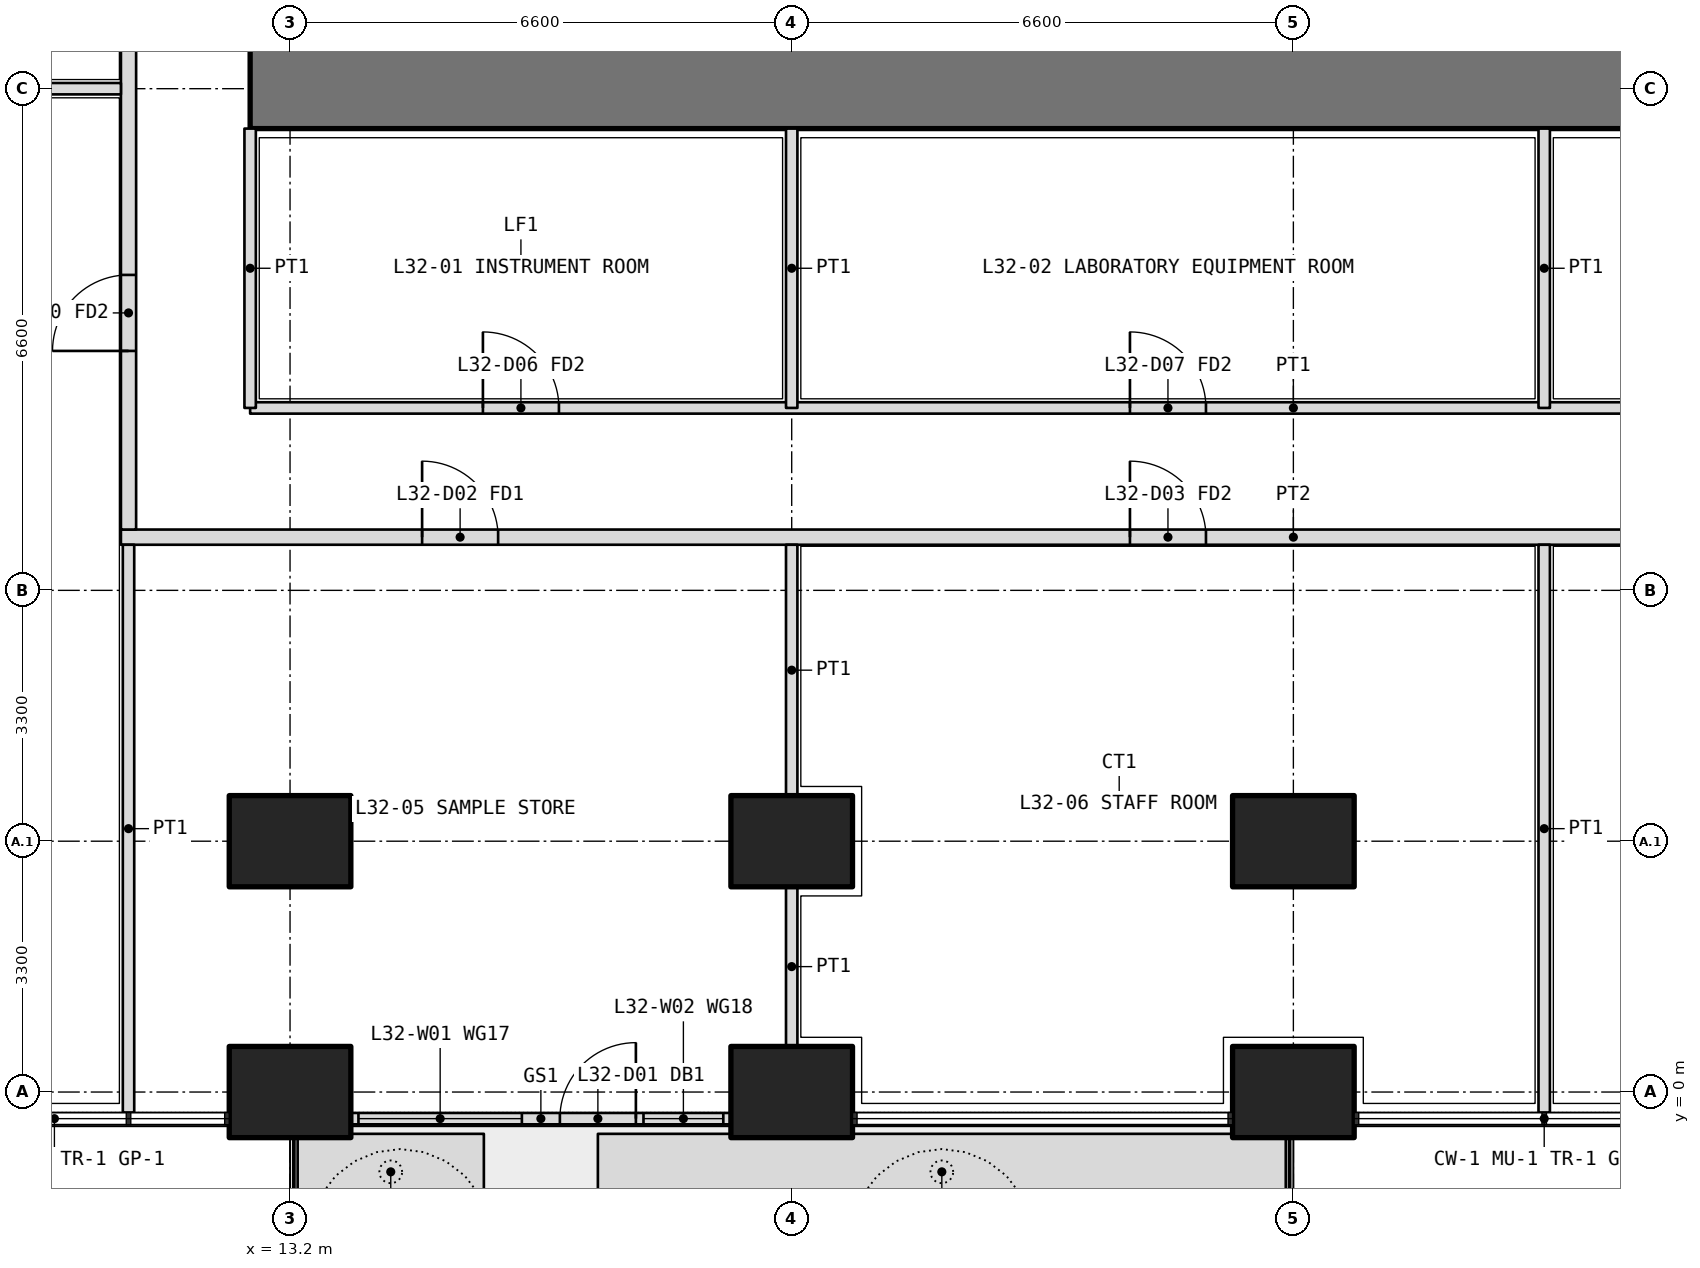
"""IFC4 building model, lengths in metres.
Left out: names, types, materials, properties, quantities, classifications, styles, units other than length and angle.
Written with IfcOpenShell. Run it as: python <this file> out.ifc"""

import sys

from ifc_helpers import new_model, si_unit, direction, frame, frame_2d, origin, origin_2d, place, context, subcontext, project, spatial, polyline, rectangle, outline, extrude, element, fill, save


model = new_model("IFC4")
c1 = context("Model", 3, precision=1e-05, world=origin(), true_north=direction((0.0, 1.0)))
c2 = subcontext(c1, "Body", "Model", "MODEL_VIEW")
j1 = project(units=[si_unit("LENGTHUNIT", "METRE"), si_unit("PLANEANGLEUNIT", "RADIAN")], contexts=[c1])
p1 = place(None, origin())
s1 = spatial("IfcSite", under=j1, at=p1, CompositionType="ELEMENT")
p2 = place(p1, origin())
s2 = spatial("IfcBuilding", under=s1, at=p2, CompositionType="ELEMENT")
p3 = place(p2, frame((0.0, 0.0, 141.0)))
s3 = spatial("IfcBuildingStorey", under=s2, at=p3, CompositionType="ELEMENT", Elevation=141.0)
for number, where, z_axis, x_axis in (
    (1, (13.2, 0.0, 0.0), (0.0, 0.0, 1.0), (1.0, 0.0, 0.0)),
    (2, (19.8, 0.0, 0.0), (0.0, 0.0, 1.0), (1.0, 0.0, 0.0)),
    (3, (26.4, 0.0, 0.0), (0.0, 0.0, 1.0), (1.0, 0.0, 0.0)),
    (4, (13.2, 3.3, 0.0), (0.0, 0.0, 1.0), (1.0, 0.0, 0.0)),
    (5, (19.8, 3.3, 0.0), (0.0, 0.0, 1.0), (1.0, 0.0, 0.0)),
    (6, (26.4, 3.3, 0.0), (0.0, 0.0, 1.0), (1.0, 0.0, 0.0)),
):
    element("IfcColumn", number, at=place(p3, frame(where, z_axis=z_axis, x_axis=x_axis)), inside=s3, PredefinedType="COLUMN", context=c2, shape_type="SweptSolid", body=[
        extrude(rectangle(XDim=1.6, YDim=1.2, at=origin_2d()), origin(), (0.0, 0.0, 1.0), 4.2),
    ])
p4 = place(p3, origin())
e7 = element("IfcWall", 7, at=p4, inside=s3, PredefinedType="USERDEFINED", context=c2, shape_type="SweptSolid", body=[
    extrude(outline(polyline([(13.3, -1.55), (15.75, -1.55), (15.75, -0.55), (13.3, -0.55), (13.3, -1.55)]), holes=[polyline([(13.45, -1.4), (15.6, -1.4), (15.6, -0.7), (13.45, -0.7), (13.45, -1.4)])]), origin(), (0.0, 0.0, 1.0), 1.05),
])
p5 = place(p3, origin())
e8 = element("IfcWall", 8, at=p5, inside=s3, PredefinedType="USERDEFINED", context=c2, shape_type="SweptSolid", body=[
    extrude(outline(polyline([(17.25, -1.55), (26.3, -1.55), (26.3, -0.55), (17.25, -0.55), (17.25, -1.55)]), holes=[polyline([(17.4, -1.4), (26.15, -1.4), (26.15, -0.7), (17.4, -0.7), (17.4, -1.4)])]), origin(), (0.0, 0.0, 1.0), 1.05),
])
p6 = place(p3, frame((14.0, -0.35, 0.0), z_axis=(0.0, 0.0, 1.0), x_axis=(1.0, 0.0, 0.0)))
e9 = element("IfcWall", 9, at=p6, inside=s3, PredefinedType="SOLIDWALL", context=c2, shape_type="SweptSolid", body=[
    extrude(rectangle(XDim=5.0, YDim=0.15, at=frame_2d((2.5, 0.0))), origin(), (0.0, 0.0, 1.0), 2.6),
])
p7 = place(p6, frame((2.75, 0.0, 0.0)))
e10 = element("IfcOpeningElement", 10, at=p7, cuts=e9, PredefinedType="OPENING", context=c2, shape_type="SweptSolid", body=[
    extrude(rectangle(XDim=1.0, YDim=2.4, at=frame_2d((0.5, 1.2))), frame((0.0, 0.085, 0.0), z_axis=(0.0, -1.0, 0.0), x_axis=(1.0, 0.0, 0.0)), (0.0, 0.0, 1.0), 0.17),
])
p8 = place(p6, frame((0.1, 0.0, 0.1)))
e11 = element("IfcOpeningElement", 11, at=p8, cuts=e9, PredefinedType="OPENING", context=c2, shape_type="SweptSolid", body=[
    extrude(rectangle(XDim=2.15, YDim=2.2, at=frame_2d((1.075, 1.1))), frame((0.0, 0.085, 0.0), z_axis=(0.0, -1.0, 0.0), x_axis=(1.0, 0.0, 0.0)), (0.0, 0.0, 1.0), 0.17),
])
p9 = place(p6, frame((3.85, 0.0, 0.1)))
e12 = element("IfcOpeningElement", 12, at=p9, cuts=e9, PredefinedType="OPENING", context=c2, shape_type="SweptSolid", body=[
    extrude(rectangle(XDim=1.05, YDim=2.2, at=frame_2d((0.525, 1.1))), frame((0.0, 0.085, 0.0), z_axis=(0.0, -1.0, 0.0), x_axis=(1.0, 0.0, 0.0)), (0.0, 0.0, 1.0), 0.17),
])
p10 = place(p3, frame((12.675, 13.2, 0.0), z_axis=(0.0, 0.0, 1.0), x_axis=(1.0, 0.0, 0.0)))
e13 = element("IfcWall", 13, at=p10, inside=s3, PredefinedType="SHEAR", context=c2, shape_type="SweptSolid", body=[
    extrude(rectangle(XDim=27.45, YDim=1.05, at=frame_2d((13.725, 0.0))), origin(), (0.0, 0.0, 1.0), 4.2),
])
p11 = place(p3, frame((12.675, 9.0, 0.0), z_axis=(0.0, 0.0, 1.0), x_axis=(1.0, 0.0, 0.0)))
e14 = element("IfcWall", 14, at=p11, inside=s3, PredefinedType="PARTITIONING", context=c2, shape_type="SweptSolid", body=[
    extrude(rectangle(XDim=27.45, YDim=0.15, at=frame_2d((13.725, 0.0))), origin(), (0.0, 0.0, 1.0), 2.85),
])
p12 = place(p11, frame((3.062, 0.0, 0.0)))
e15 = element("IfcOpeningElement", 15, at=p12, cuts=e14, PredefinedType="OPENING", context=c2, shape_type="SweptSolid", body=[
    extrude(rectangle(XDim=1.0, YDim=2.1, at=frame_2d((0.5, 1.05))), frame((0.0, 0.085, 0.0), z_axis=(0.0, -1.0, 0.0), x_axis=(1.0, 0.0, 0.0)), (0.0, 0.0, 1.0), 0.17),
])
p13 = place(p11, frame((11.575, 0.0, 0.0)))
e16 = element("IfcOpeningElement", 16, at=p13, cuts=e14, PredefinedType="OPENING", context=c2, shape_type="SweptSolid", body=[
    extrude(rectangle(XDim=1.0, YDim=2.1, at=frame_2d((0.5, 1.05))), frame((0.0, 0.085, 0.0), z_axis=(0.0, -1.0, 0.0), x_axis=(1.0, 0.0, 0.0)), (0.0, 0.0, 1.0), 0.17),
])
p14 = place(p11, frame((19.825, 0.0, 0.0)))
e17 = element("IfcOpeningElement", 17, at=p14, cuts=e14, PredefinedType="OPENING", context=c2, shape_type="SweptSolid", body=[
    extrude(rectangle(XDim=1.0, YDim=2.1, at=frame_2d((0.5, 1.05))), frame((0.0, 0.085, 0.0), z_axis=(0.0, -1.0, 0.0), x_axis=(1.0, 0.0, 0.0)), (0.0, 0.0, 1.0), 0.17),
])
p15 = place(p11, frame((25.038, 0.0, 0.0)))
e18 = element("IfcOpeningElement", 18, at=p15, cuts=e14, PredefinedType="OPENING", context=c2, shape_type="SweptSolid", body=[
    extrude(rectangle(XDim=1.0, YDim=2.1, at=frame_2d((0.5, 1.05))), frame((0.0, 0.085, 0.0), z_axis=(0.0, -1.0, 0.0), x_axis=(1.0, 0.0, 0.0)), (0.0, 0.0, 1.0), 0.17),
])
for number, where, z_axis, x_axis in (
    (19, (12.675, 12.675, 0.0), (0.0, 0.0, 1.0), (0.0, -1.0, 0.0)),
    (20, (19.8, 12.675, 0.0), (0.0, 0.0, 1.0), (0.0, -1.0, 0.0)),
):
    element("IfcWall", number, at=place(p3, frame(where, z_axis=z_axis, x_axis=x_axis)), inside=s3, PredefinedType="PARTITIONING", context=c2, shape_type="SweptSolid", body=[
        extrude(rectangle(XDim=3.675, YDim=0.15, at=frame_2d((1.837, 0.0))), origin(), (0.0, 0.0, 1.0), 2.85),
    ])
p16 = place(p3, frame((29.7, 12.675, 0.0), z_axis=(0.0, 0.0, 1.0), x_axis=(0.0, -1.0, 0.0)))
e21 = element("IfcWall", 21, at=p16, inside=s3, PredefinedType="PARTITIONING", context=c2, shape_type="SweptSolid", body=[
    extrude(rectangle(XDim=3.675, YDim=0.15, at=frame_2d((1.837, 0.0))), origin(), (0.0, 0.0, 1.0), 3.9),
])
p17 = place(p3, frame((10.975, 7.3, 0.0), z_axis=(0.0, 0.0, 1.0), x_axis=(1.0, 0.0, 0.0)))
e22 = element("IfcWall", 22, at=p17, inside=s3, PredefinedType="PARTITIONING", context=c2, shape_type="SweptSolid", body=[
    extrude(rectangle(XDim=30.85, YDim=0.2, at=frame_2d((15.425, 0.0))), origin(), (0.0, 0.0, 1.0), 2.85),
])
p18 = place(p17, frame((3.962, 0.0, 0.0)))
e23 = element("IfcOpeningElement", 23, at=p18, cuts=e22, PredefinedType="OPENING", context=c2, shape_type="SweptSolid", body=[
    extrude(rectangle(XDim=1.0, YDim=2.1, at=frame_2d((0.5, 1.05))), frame((0.0, 0.11, 0.0), z_axis=(0.0, -1.0, 0.0), x_axis=(1.0, 0.0, 0.0)), (0.0, 0.0, 1.0), 0.22),
])
p19 = place(p17, frame((13.275, 0.0, 0.0)))
e24 = element("IfcOpeningElement", 24, at=p19, cuts=e22, PredefinedType="OPENING", context=c2, shape_type="SweptSolid", body=[
    extrude(rectangle(XDim=1.0, YDim=2.1, at=frame_2d((0.5, 1.05))), frame((0.0, 0.11, 0.0), z_axis=(0.0, -1.0, 0.0), x_axis=(1.0, 0.0, 0.0)), (0.0, 0.0, 1.0), 0.22),
])
p20 = place(p17, frame((21.525, 0.0, 0.0)))
e25 = element("IfcOpeningElement", 25, at=p20, cuts=e22, PredefinedType="OPENING", context=c2, shape_type="SweptSolid", body=[
    extrude(rectangle(XDim=1.0, YDim=2.1, at=frame_2d((0.5, 1.05))), frame((0.0, 0.11, 0.0), z_axis=(0.0, -1.0, 0.0), x_axis=(1.0, 0.0, 0.0)), (0.0, 0.0, 1.0), 0.22),
])
p21 = place(p17, frame((27.438, 0.0, 0.0)))
e26 = element("IfcOpeningElement", 26, at=p21, cuts=e22, PredefinedType="OPENING", context=c2, shape_type="SweptSolid", body=[
    extrude(rectangle(XDim=1.2, YDim=2.1, at=frame_2d((0.6, 1.05))), frame((0.0, 0.11, 0.0), z_axis=(0.0, -1.0, 0.0), x_axis=(1.0, 0.0, 0.0)), (0.0, 0.0, 1.0), 0.22),
])
p22 = place(p3, frame((11.075, 7.4, 0.0), z_axis=(0.0, 0.0, 1.0), x_axis=(0.0, 1.0, 0.0)))
e27 = element("IfcWall", 27, at=p22, inside=s3, PredefinedType="PARTITIONING", context=c2, shape_type="SweptSolid", body=[
    extrude(rectangle(XDim=27.625, YDim=0.2, at=frame_2d((13.812, 0.0))), origin(), (0.0, 0.0, 1.0), 2.85),
])
p23 = place(p22, frame((2.35, 0.0, 0.0)))
e28 = element("IfcOpeningElement", 28, at=p23, cuts=e27, PredefinedType="OPENING", context=c2, shape_type="SweptSolid", body=[
    extrude(rectangle(XDim=1.0, YDim=2.1, at=frame_2d((0.5, 1.05))), frame((0.0, 0.11, 0.0), z_axis=(0.0, -1.0, 0.0), x_axis=(1.0, 0.0, 0.0)), (0.0, 0.0, 1.0), 0.22),
])
p24 = place(p22, frame((6.35, 0.0, 0.0)))
e29 = element("IfcOpeningElement", 29, at=p24, cuts=e27, PredefinedType="OPENING", context=c2, shape_type="SweptSolid", body=[
    extrude(rectangle(XDim=1.0, YDim=2.1, at=frame_2d((0.5, 1.05))), frame((0.0, 0.11, 0.0), z_axis=(0.0, -1.0, 0.0), x_axis=(1.0, 0.0, 0.0)), (0.0, 0.0, 1.0), 0.22),
])
p25 = place(p22, frame((9.4, 0.0, 0.0)))
e30 = element("IfcOpeningElement", 30, at=p25, cuts=e27, PredefinedType="OPENING", context=c2, shape_type="SweptSolid", body=[
    extrude(rectangle(XDim=0.9, YDim=2.1, at=frame_2d((0.45, 1.05))), frame((0.0, 0.11, 0.0), z_axis=(0.0, -1.0, 0.0), x_axis=(1.0, 0.0, 0.0)), (0.0, 0.0, 1.0), 0.22),
])
p26 = place(p22, frame((13.2, 0.0, 0.0)))
e31 = element("IfcOpeningElement", 31, at=p26, cuts=e27, PredefinedType="OPENING", context=c2, shape_type="SweptSolid", body=[
    extrude(rectangle(XDim=0.9, YDim=2.1, at=frame_2d((0.45, 1.05))), frame((0.0, 0.11, 0.0), z_axis=(0.0, -1.0, 0.0), x_axis=(1.0, 0.0, 0.0)), (0.0, 0.0, 1.0), 0.22),
])
p27 = place(p22, frame((16.75, 0.0, 0.0)))
e32 = element("IfcOpeningElement", 32, at=p27, cuts=e27, PredefinedType="OPENING", context=c2, shape_type="SweptSolid", body=[
    extrude(rectangle(XDim=1.0, YDim=2.1, at=frame_2d((0.5, 1.05))), frame((0.0, 0.11, 0.0), z_axis=(0.0, -1.0, 0.0), x_axis=(1.0, 0.0, 0.0)), (0.0, 0.0, 1.0), 0.22),
])
p28 = place(p22, frame((21.8, 0.0, 0.0)))
e33 = element("IfcOpeningElement", 33, at=p28, cuts=e27, PredefinedType="OPENING", context=c2, shape_type="SweptSolid", body=[
    extrude(rectangle(XDim=1.0, YDim=2.1, at=frame_2d((0.5, 1.05))), frame((0.0, 0.11, 0.0), z_axis=(0.0, -1.0, 0.0), x_axis=(1.0, 0.0, 0.0)), (0.0, 0.0, 1.0), 0.22),
])
p29 = place(p22, frame((26.163, 0.0, 0.0)))
e34 = element("IfcOpeningElement", 34, at=p29, cuts=e27, PredefinedType="OPENING", context=c2, shape_type="SweptSolid", body=[
    extrude(rectangle(XDim=1.0, YDim=2.1, at=frame_2d((0.5, 1.05))), frame((0.0, 0.11, 0.0), z_axis=(0.0, -1.0, 0.0), x_axis=(1.0, 0.0, 0.0)), (0.0, 0.0, 1.0), 0.22),
])
p30 = place(p3, frame((11.075, -0.27, 0.0), z_axis=(0.0, 0.0, 1.0), x_axis=(0.0, 1.0, 0.0)))
e35 = element("IfcWall", 35, at=p30, inside=s3, PredefinedType="PARTITIONING", context=c2, shape_type="SweptSolid", body=[
    extrude(rectangle(XDim=7.47, YDim=0.15, at=frame_2d((3.735, 0.0))), origin(), (0.0, 0.0, 1.0), 2.6),
])
p31 = place(p3, frame((19.8, 0.6, 0.0), z_axis=(0.0, 0.0, 1.0), x_axis=(0.0, 1.0, 0.0)))
e36 = element("IfcWall", 36, at=p31, inside=s3, PredefinedType="PARTITIONING", context=c2, shape_type="SweptSolid", body=[
    extrude(rectangle(XDim=2.1, YDim=0.15, at=frame_2d((1.05, 0.0))), origin(), (0.0, 0.0, 1.0), 2.85),
])
p32 = place(p3, frame((19.8, 3.9, 0.0), z_axis=(0.0, 0.0, 1.0), x_axis=(0.0, 1.0, 0.0)))
e37 = element("IfcWall", 37, at=p32, inside=s3, PredefinedType="PARTITIONING", context=c2, shape_type="SweptSolid", body=[
    extrude(rectangle(XDim=3.3, YDim=0.15, at=frame_2d((1.65, 0.0))), origin(), (0.0, 0.0, 1.0), 2.85),
])
p33 = place(p3, frame((29.7, -0.27, 0.0), z_axis=(0.0, 0.0, 1.0), x_axis=(0.0, 1.0, 0.0)))
e38 = element("IfcWall", 38, at=p33, inside=s3, PredefinedType="PARTITIONING", context=c2, shape_type="SweptSolid", body=[
    extrude(rectangle(XDim=7.47, YDim=0.15, at=frame_2d((3.735, 0.0))), origin(), (0.0, 0.0, 1.0), 2.6),
])
p34 = place(p3, frame((7.2, 13.2, 0.0), z_axis=(0.0, 0.0, 1.0), x_axis=(1.0, 0.0, 0.0)))
e39 = element("IfcWall", 39, at=p34, inside=s3, PredefinedType="PARTITIONING", context=c2, shape_type="SweptSolid", body=[
    extrude(rectangle(XDim=3.775, YDim=0.15, at=frame_2d((1.888, 0.0))), origin(), (0.0, 0.0, 1.0), 2.85),
])
p35 = place(p7, origin())
e40 = element("IfcDoor", 40, at=p35, inside=s3, OperationType="SINGLE_SWING_RIGHT", PredefinedType="DOOR", context=c2, shape_type="SweptSolid", body=[
    extrude(rectangle(XDim=1.0, YDim=2.4, at=frame_2d((0.5, 1.2))), frame((0.0, 0.025, 0.0), z_axis=(0.0, -1.0, 0.0), x_axis=(1.0, 0.0, 0.0)), (0.0, 0.0, 1.0), 0.05),
])
fill(e10, e40)
p36 = place(p8, origin())
e41 = element("IfcWindow", 41, at=p36, inside=s3, PartitioningType="SINGLE_PANEL", PredefinedType="WINDOW", context=c2, shape_type="SweptSolid", body=[
    extrude(rectangle(XDim=2.15, YDim=2.2, at=frame_2d((1.075, 1.1))), frame((0.0, 0.03, 0.0), z_axis=(0.0, -1.0, 0.0), x_axis=(1.0, 0.0, 0.0)), (0.0, 0.0, 1.0), 0.06),
])
fill(e11, e41)
p37 = place(p9, origin())
e42 = element("IfcWindow", 42, at=p37, inside=s3, PartitioningType="SINGLE_PANEL", PredefinedType="WINDOW", context=c2, shape_type="SweptSolid", body=[
    extrude(rectangle(XDim=1.05, YDim=2.2, at=frame_2d((0.525, 1.1))), frame((0.0, 0.03, 0.0), z_axis=(0.0, -1.0, 0.0), x_axis=(1.0, 0.0, 0.0)), (0.0, 0.0, 1.0), 0.06),
])
fill(e12, e42)
p38 = place(p12, origin())
e43 = element("IfcDoor", 43, at=p38, inside=s3, OperationType="SINGLE_SWING_LEFT", PredefinedType="DOOR", context=c2, shape_type="SweptSolid", body=[
    extrude(rectangle(XDim=1.0, YDim=2.1, at=frame_2d((0.5, 1.05))), frame((0.0, 0.025, 0.0), z_axis=(0.0, -1.0, 0.0), x_axis=(1.0, 0.0, 0.0)), (0.0, 0.0, 1.0), 0.05),
])
fill(e15, e43)
p39 = place(p13, origin())
e44 = element("IfcDoor", 44, at=p39, inside=s3, OperationType="SINGLE_SWING_LEFT", PredefinedType="DOOR", context=c2, shape_type="SweptSolid", body=[
    extrude(rectangle(XDim=1.0, YDim=2.1, at=frame_2d((0.5, 1.05))), frame((0.0, 0.025, 0.0), z_axis=(0.0, -1.0, 0.0), x_axis=(1.0, 0.0, 0.0)), (0.0, 0.0, 1.0), 0.05),
])
fill(e16, e44)
p40 = place(p18, origin())
e45 = element("IfcDoor", 45, at=p40, inside=s3, OperationType="SINGLE_SWING_LEFT", PredefinedType="DOOR", context=c2, shape_type="SweptSolid", body=[
    extrude(rectangle(XDim=1.0, YDim=2.1, at=frame_2d((0.5, 1.05))), frame((0.0, 0.025, 0.0), z_axis=(0.0, -1.0, 0.0), x_axis=(1.0, 0.0, 0.0)), (0.0, 0.0, 1.0), 0.05),
])
fill(e23, e45)
p41 = place(p19, origin())
e46 = element("IfcDoor", 46, at=p41, inside=s3, OperationType="SINGLE_SWING_LEFT", PredefinedType="DOOR", context=c2, shape_type="SweptSolid", body=[
    extrude(rectangle(XDim=1.0, YDim=2.1, at=frame_2d((0.5, 1.05))), frame((0.0, 0.025, 0.0), z_axis=(0.0, -1.0, 0.0), x_axis=(1.0, 0.0, 0.0)), (0.0, 0.0, 1.0), 0.05),
])
fill(e24, e46)
p42 = place(p23, origin())
e47 = element("IfcDoor", 47, at=p42, inside=s3, OperationType="SINGLE_SWING_LEFT", PredefinedType="DOOR", context=c2, shape_type="SweptSolid", body=[
    extrude(rectangle(XDim=1.0, YDim=2.1, at=frame_2d((0.5, 1.05))), frame((0.0, 0.025, 0.0), z_axis=(0.0, -1.0, 0.0), x_axis=(1.0, 0.0, 0.0)), (0.0, 0.0, 1.0), 0.05),
])
fill(e28, e47)
save(model, sys.argv[1])
